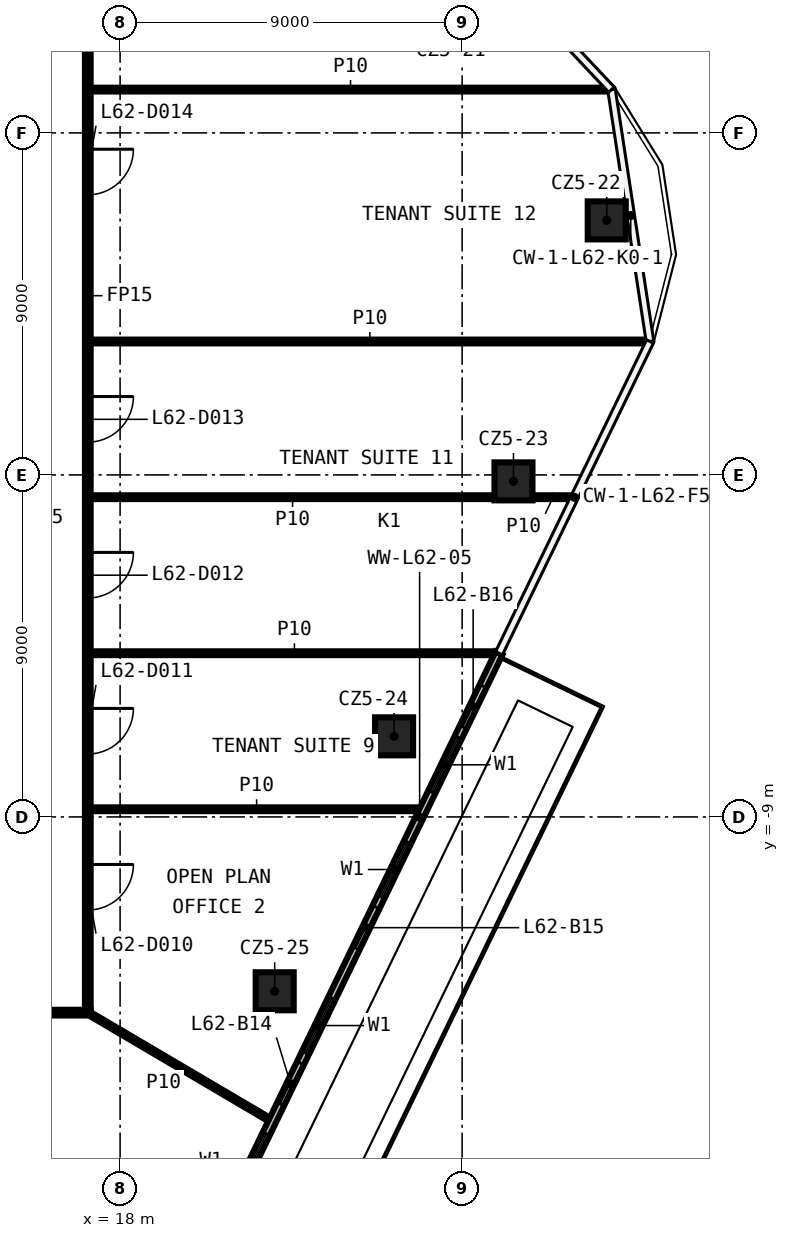
"""IFC4 building model, lengths in metres.
Left out: names, types, materials, properties, quantities, classifications, styles, units other than length and angle.
Written with IfcOpenShell. Run it as: python <this file> out.ifc"""

import sys

from ifc_helpers import new_model, si_unit, direction, frame, frame_2d, origin, origin_2d, place, context, subcontext, project, spatial, rectangle, extrude, element, fill, save


model = new_model("IFC4")
c1 = context("Model", 3, precision=1e-05, world=origin(), true_north=direction((0.0, 1.0)))
c2 = subcontext(c1, "Body", "Model", "MODEL_VIEW")
j1 = project(units=[si_unit("LENGTHUNIT", "METRE"), si_unit("PLANEANGLEUNIT", "RADIAN")], contexts=[c1])
p1 = place(None, origin())
s1 = spatial("IfcSite", under=j1, at=p1, CompositionType="ELEMENT")
p2 = place(p1, origin())
s2 = spatial("IfcBuilding", under=s1, at=p2, CompositionType="ELEMENT")
p3 = place(p2, frame((0.0, 0.0, 294.2)))
s3 = spatial("IfcBuildingStorey", under=s2, at=p3, CompositionType="ELEMENT", Elevation=294.2)
for number, where, z_axis, x_axis in (
    (1, (30.805, 6.698, 0.0), (0.0, 0.0, 1.0), (1.0, 0.0, 0.0)),
    (2, (28.351, -0.17, 0.0), (0.0, 0.0, 1.0), (1.0, 0.0, 0.0)),
    (3, (25.21, -6.879, 0.0), (0.0, 0.0, 1.0), (1.0, 0.0, 0.0)),
    (4, (22.068, -13.588, 0.0), (0.0, 0.0, 1.0), (1.0, 0.0, 0.0)),
):
    element("IfcColumn", number, at=place(p3, frame(where, z_axis=z_axis, x_axis=x_axis)), inside=s3, PredefinedType="COLUMN", context=c2, shape_type="SweptSolid", body=[
        extrude(rectangle(XDim=1.0, YDim=1.0, at=origin_2d()), origin(), (0.0, 0.0, 1.0), 3.82),
    ])
p4 = place(p3, frame((17.225, -14.15, 0.0), z_axis=(0.0, 0.0, 1.0), x_axis=(-1.0, 0.0, 0.0)))
e5 = element("IfcWall", 5, at=p4, inside=s3, PredefinedType="PARTITIONING", context=c2, shape_type="SweptSolid", body=[
    extrude(rectangle(XDim=34.45, YDim=0.15, at=frame_2d((17.225, 0.0))), origin(), (0.0, 0.0, 1.0), 3.82),
])
p5 = place(p4, frame((31.54, 0.0, 0.0)))
e6 = element("IfcOpeningElement", 6, at=p5, cuts=e5, PredefinedType="OPENING", context=c2, shape_type="SweptSolid", body=[
    extrude(rectangle(XDim=1.2, YDim=2.1, at=frame_2d((0.6, 1.05))), frame((0.0, 0.085, 0.0), z_axis=(0.0, -1.0, 0.0), x_axis=(1.0, 0.0, 0.0)), (0.0, 0.0, 1.0), 0.17),
])
p6 = place(p4, frame((25.804, 0.0, 0.0)))
e7 = element("IfcOpeningElement", 7, at=p6, cuts=e5, PredefinedType="OPENING", context=c2, shape_type="SweptSolid", body=[
    extrude(rectangle(XDim=1.2, YDim=2.1, at=frame_2d((0.6, 1.05))), frame((0.0, 0.085, 0.0), z_axis=(0.0, -1.0, 0.0), x_axis=(1.0, 0.0, 0.0)), (0.0, 0.0, 1.0), 0.17),
])
p7 = place(p4, frame((17.681, 0.0, 0.0)))
e8 = element("IfcOpeningElement", 8, at=p7, cuts=e5, PredefinedType="OPENING", context=c2, shape_type="SweptSolid", body=[
    extrude(rectangle(XDim=1.2, YDim=2.1, at=frame_2d((0.6, 1.05))), frame((0.0, 0.085, 0.0), z_axis=(0.0, -1.0, 0.0), x_axis=(1.0, 0.0, 0.0)), (0.0, 0.0, 1.0), 0.17),
])
p8 = place(p4, frame((10.752, 0.0, 0.0)))
e9 = element("IfcOpeningElement", 9, at=p8, cuts=e5, PredefinedType="OPENING", context=c2, shape_type="SweptSolid", body=[
    extrude(rectangle(XDim=1.2, YDim=2.1, at=frame_2d((0.6, 1.05))), frame((0.0, 0.085, 0.0), z_axis=(0.0, -1.0, 0.0), x_axis=(1.0, 0.0, 0.0)), (0.0, 0.0, 1.0), 0.17),
])
p9 = place(p4, frame((6.133, 0.0, 0.0)))
e10 = element("IfcOpeningElement", 10, at=p9, cuts=e5, PredefinedType="OPENING", context=c2, shape_type="SweptSolid", body=[
    extrude(rectangle(XDim=1.2, YDim=2.1, at=frame_2d((0.6, 1.05))), frame((0.0, 0.085, 0.0), z_axis=(0.0, -1.0, 0.0), x_axis=(1.0, 0.0, 0.0)), (0.0, 0.0, 1.0), 0.17),
])
p10 = place(p4, frame((1.851, 0.0, 0.0)))
e11 = element("IfcOpeningElement", 11, at=p10, cuts=e5, PredefinedType="OPENING", context=c2, shape_type="SweptSolid", body=[
    extrude(rectangle(XDim=1.2, YDim=2.1, at=frame_2d((0.6, 1.05))), frame((0.0, 0.085, 0.0), z_axis=(0.0, -1.0, 0.0), x_axis=(1.0, 0.0, 0.0)), (0.0, 0.0, 1.0), 0.17),
])
p11 = place(p3, frame((17.225, -8.798, 0.0), z_axis=(0.0, 0.0, 1.0), x_axis=(1.0, 0.0, 0.0)))
e12 = element("IfcWall", 12, at=p11, inside=s3, PredefinedType="PARTITIONING", context=c2, shape_type="SweptSolid", body=[
    extrude(rectangle(XDim=8.735, YDim=0.1, at=frame_2d((4.368, 0.0))), origin(), (0.0, 0.0, 1.0), 3.82),
])
p12 = place(p3, frame((17.225, -4.692, 0.0), z_axis=(0.0, 0.0, 1.0), x_axis=(1.0, 0.0, 0.0)))
e13 = element("IfcWall", 13, at=p12, inside=s3, PredefinedType="PARTITIONING", context=c2, shape_type="SweptSolid", body=[
    extrude(rectangle(XDim=10.723, YDim=0.1, at=frame_2d((5.362, 0.0))), origin(), (0.0, 0.0, 1.0), 3.82),
])
p13 = place(p3, frame((17.225, -0.586, 0.0), z_axis=(0.0, 0.0, 1.0), x_axis=(1.0, 0.0, 0.0)))
e14 = element("IfcWall", 14, at=p13, inside=s3, PredefinedType="PARTITIONING", context=c2, shape_type="SweptSolid", body=[
    extrude(rectangle(XDim=10.626, YDim=0.1, at=frame_2d((5.313, 0.0))), origin(), (0.0, 0.0, 1.0), 3.82),
])
p14 = place(p3, frame((28.851, -0.586, 0.0), z_axis=(0.0, 0.0, 1.0), x_axis=(1.0, 0.0, 0.0)))
e15 = element("IfcWall", 15, at=p14, inside=s3, PredefinedType="PARTITIONING", context=c2, shape_type="SweptSolid", body=[
    extrude(rectangle(XDim=1.086, YDim=0.1, at=frame_2d((0.543, 0.0))), origin(), (0.0, 0.0, 1.0), 3.82),
])
p15 = place(p3, frame((17.225, 3.511, 0.0), z_axis=(0.0, 0.0, 1.0), x_axis=(1.0, 0.0, 0.0)))
e16 = element("IfcWall", 16, at=p15, inside=s3, PredefinedType="PARTITIONING", context=c2, shape_type="SweptSolid", body=[
    extrude(rectangle(XDim=14.696, YDim=0.1, at=frame_2d((7.348, 0.0))), origin(), (0.0, 0.0, 1.0), 3.82),
])
p16 = place(p3, frame((17.225, 10.14, 0.0), z_axis=(0.0, 0.0, 1.0), x_axis=(1.0, 0.0, 0.0)))
e17 = element("IfcWall", 17, at=p16, inside=s3, PredefinedType="PARTITIONING", context=c2, shape_type="SweptSolid", body=[
    extrude(rectangle(XDim=13.677, YDim=0.1, at=frame_2d((6.839, 0.0))), origin(), (0.0, 0.0, 1.0), 3.82),
])
p17 = place(p3, frame((17.15, 14.075, 0.0), z_axis=(0.0, 0.0, 1.0), x_axis=(0.0, -1.0, 0.0)))
e18 = element("IfcWall", 18, at=p17, inside=s3, PredefinedType="PARTITIONING", context=c2, shape_type="SweptSolid", body=[
    extrude(rectangle(XDim=28.15, YDim=0.15, at=frame_2d((14.075, 0.0))), origin(), (0.0, 0.0, 1.0), 3.82),
])
p18 = place(p17, frame((24.326, 0.0, 0.0)))
e19 = element("IfcOpeningElement", 19, at=p18, cuts=e18, PredefinedType="OPENING", context=c2, shape_type="SweptSolid", body=[
    extrude(rectangle(XDim=1.2, YDim=2.1, at=frame_2d((0.6, 1.05))), frame((0.0, 0.085, 0.0), z_axis=(0.0, -1.0, 0.0), x_axis=(1.0, 0.0, 0.0)), (0.0, 0.0, 1.0), 0.17),
])
p19 = place(p17, frame((20.22, 0.0, 0.0)))
e20 = element("IfcOpeningElement", 20, at=p19, cuts=e18, PredefinedType="OPENING", context=c2, shape_type="SweptSolid", body=[
    extrude(rectangle(XDim=1.2, YDim=2.1, at=frame_2d((0.6, 1.05))), frame((0.0, 0.085, 0.0), z_axis=(0.0, -1.0, 0.0), x_axis=(1.0, 0.0, 0.0)), (0.0, 0.0, 1.0), 0.17),
])
p20 = place(p17, frame((16.114, 0.0, 0.0)))
e21 = element("IfcOpeningElement", 21, at=p20, cuts=e18, PredefinedType="OPENING", context=c2, shape_type="SweptSolid", body=[
    extrude(rectangle(XDim=1.2, YDim=2.1, at=frame_2d((0.6, 1.05))), frame((0.0, 0.085, 0.0), z_axis=(0.0, -1.0, 0.0), x_axis=(1.0, 0.0, 0.0)), (0.0, 0.0, 1.0), 0.17),
])
p21 = place(p17, frame((12.012, 0.0, 0.0)))
e22 = element("IfcOpeningElement", 22, at=p21, cuts=e18, PredefinedType="OPENING", context=c2, shape_type="SweptSolid", body=[
    extrude(rectangle(XDim=1.2, YDim=2.1, at=frame_2d((0.6, 1.05))), frame((0.0, 0.085, 0.0), z_axis=(0.0, -1.0, 0.0), x_axis=(1.0, 0.0, 0.0)), (0.0, 0.0, 1.0), 0.17),
])
p22 = place(p17, frame((5.504, 0.0, 0.0)))
e23 = element("IfcOpeningElement", 23, at=p22, cuts=e18, PredefinedType="OPENING", context=c2, shape_type="SweptSolid", body=[
    extrude(rectangle(XDim=1.2, YDim=2.1, at=frame_2d((0.6, 1.05))), frame((0.0, 0.085, 0.0), z_axis=(0.0, -1.0, 0.0), x_axis=(1.0, 0.0, 0.0)), (0.0, 0.0, 1.0), 0.17),
])
p23 = place(p17, frame((1.622, 0.0, 0.0)))
e24 = element("IfcOpeningElement", 24, at=p23, cuts=e18, PredefinedType="OPENING", context=c2, shape_type="SweptSolid", body=[
    extrude(rectangle(XDim=1.2, YDim=2.1, at=frame_2d((0.6, 1.05))), frame((0.0, 0.085, 0.0), z_axis=(0.0, -1.0, 0.0), x_axis=(1.0, 0.0, 0.0)), (0.0, 0.0, 1.0), 0.17),
])
p24 = place(p3, frame((17.15, -14.15, 0.0), z_axis=(0.0, 0.0, 1.0), x_axis=(0.861619958058, -0.507553985184, 0.0)))
e25 = element("IfcWall", 25, at=p24, inside=s3, PredefinedType="PARTITIONING", context=c2, shape_type="SweptSolid", body=[
    extrude(rectangle(XDim=5.615, YDim=0.1, at=frame_2d((2.808, 0.0))), origin(), (0.0, 0.0, 1.0), 3.82),
])
p25 = place(p3, frame((20.017, -21.116, 0.0), z_axis=(0.0, 0.0, 1.0), x_axis=(0.435859541182, 0.90001470008, 0.0)))
e26 = element("IfcWall", 26, at=p25, inside=s3, PredefinedType="SOLIDWALL", context=c2, shape_type="SweptSolid", body=[
    extrude(rectangle(XDim=18.249, YDim=0.2, at=frame_2d((9.125, 0.0))), origin(), (0.0, 0.0, 1.0), 3.82),
])
p26 = place(p25, frame((2.6, 0.0, 0.6)))
e27 = element("IfcOpeningElement", 27, at=p26, cuts=e26, PredefinedType="OPENING", context=c2, shape_type="SweptSolid", body=[
    extrude(rectangle(XDim=1.6, YDim=2.4, at=frame_2d((0.8, 1.2))), frame((0.0, 0.11, 0.0), z_axis=(0.0, -1.0, 0.0), x_axis=(1.0, 0.0, 0.0)), (0.0, 0.0, 1.0), 0.22),
])
p27 = place(p25, frame((1.1, 0.0, 0.0)))
e28 = element("IfcOpeningElement", 28, at=p27, cuts=e26, PredefinedType="OPENING", context=c2, shape_type="SweptSolid", body=[
    extrude(rectangle(XDim=1.2, YDim=2.4, at=frame_2d((0.6, 1.2))), frame((0.0, 0.11, 0.0), z_axis=(0.0, -1.0, 0.0), x_axis=(1.0, 0.0, 0.0)), (0.0, 0.0, 1.0), 0.22),
])
p28 = place(p25, frame((6.562, 0.0, 0.6)))
e29 = element("IfcOpeningElement", 29, at=p28, cuts=e26, PredefinedType="OPENING", context=c2, shape_type="SweptSolid", body=[
    extrude(rectangle(XDim=1.6, YDim=2.4, at=frame_2d((0.8, 1.2))), frame((0.0, 0.11, 0.0), z_axis=(0.0, -1.0, 0.0), x_axis=(1.0, 0.0, 0.0)), (0.0, 0.0, 1.0), 0.22),
])
p29 = place(p25, frame((5.062, 0.0, 0.0)))
e30 = element("IfcOpeningElement", 30, at=p29, cuts=e26, PredefinedType="OPENING", context=c2, shape_type="SweptSolid", body=[
    extrude(rectangle(XDim=1.2, YDim=2.4, at=frame_2d((0.6, 1.2))), frame((0.0, 0.11, 0.0), z_axis=(0.0, -1.0, 0.0), x_axis=(1.0, 0.0, 0.0)), (0.0, 0.0, 1.0), 0.22),
])
p30 = place(p25, frame((11.125, 0.0, 0.6)))
e31 = element("IfcOpeningElement", 31, at=p30, cuts=e26, PredefinedType="OPENING", context=c2, shape_type="SweptSolid", body=[
    extrude(rectangle(XDim=1.6, YDim=2.4, at=frame_2d((0.8, 1.2))), frame((0.0, 0.11, 0.0), z_axis=(0.0, -1.0, 0.0), x_axis=(1.0, 0.0, 0.0)), (0.0, 0.0, 1.0), 0.22),
])
p31 = place(p25, frame((9.625, 0.0, 0.0)))
e32 = element("IfcOpeningElement", 32, at=p31, cuts=e26, PredefinedType="OPENING", context=c2, shape_type="SweptSolid", body=[
    extrude(rectangle(XDim=1.2, YDim=2.4, at=frame_2d((0.6, 1.2))), frame((0.0, 0.11, 0.0), z_axis=(0.0, -1.0, 0.0), x_axis=(1.0, 0.0, 0.0)), (0.0, 0.0, 1.0), 0.22),
])
p32 = place(p25, frame((14.187, 0.0, 0.6)))
e33 = element("IfcOpeningElement", 33, at=p32, cuts=e26, PredefinedType="OPENING", context=c2, shape_type="SweptSolid", body=[
    extrude(rectangle(XDim=1.6, YDim=2.4, at=frame_2d((0.8, 1.2))), frame((0.0, 0.11, 0.0), z_axis=(0.0, -1.0, 0.0), x_axis=(1.0, 0.0, 0.0)), (0.0, 0.0, 1.0), 0.22),
])
p33 = place(p25, frame((16.087, 0.0, 0.0)))
e34 = element("IfcOpeningElement", 34, at=p33, cuts=e26, PredefinedType="OPENING", context=c2, shape_type="SweptSolid", body=[
    extrude(rectangle(XDim=1.2, YDim=2.4, at=frame_2d((0.6, 1.2))), frame((0.0, 0.11, 0.0), z_axis=(0.0, -1.0, 0.0), x_axis=(1.0, 0.0, 0.0)), (0.0, 0.0, 1.0), 0.22),
])
p34 = place(p18, origin())
e35 = element("IfcDoor", 35, at=p34, inside=s3, OperationType="SINGLE_SWING_LEFT", PredefinedType="DOOR", context=c2, shape_type="SweptSolid", body=[
    extrude(rectangle(XDim=1.2, YDim=2.1, at=frame_2d((0.6, 1.05))), frame((0.0, 0.025, 0.0), z_axis=(0.0, -1.0, 0.0), x_axis=(1.0, 0.0, 0.0)), (0.0, 0.0, 1.0), 0.05),
])
fill(e19, e35)
p35 = place(p19, origin())
e36 = element("IfcDoor", 36, at=p35, inside=s3, OperationType="SINGLE_SWING_RIGHT", PredefinedType="DOOR", context=c2, shape_type="SweptSolid", body=[
    extrude(rectangle(XDim=1.2, YDim=2.1, at=frame_2d((0.6, 1.05))), frame((0.0, 0.025, 0.0), z_axis=(0.0, -1.0, 0.0), x_axis=(1.0, 0.0, 0.0)), (0.0, 0.0, 1.0), 0.05),
])
fill(e20, e36)
p36 = place(p20, origin())
e37 = element("IfcDoor", 37, at=p36, inside=s3, OperationType="SINGLE_SWING_LEFT", PredefinedType="DOOR", context=c2, shape_type="SweptSolid", body=[
    extrude(rectangle(XDim=1.2, YDim=2.1, at=frame_2d((0.6, 1.05))), frame((0.0, 0.025, 0.0), z_axis=(0.0, -1.0, 0.0), x_axis=(1.0, 0.0, 0.0)), (0.0, 0.0, 1.0), 0.05),
])
fill(e21, e37)
p37 = place(p21, origin())
e38 = element("IfcDoor", 38, at=p37, inside=s3, OperationType="SINGLE_SWING_RIGHT", PredefinedType="DOOR", context=c2, shape_type="SweptSolid", body=[
    extrude(rectangle(XDim=1.2, YDim=2.1, at=frame_2d((0.6, 1.05))), frame((0.0, 0.025, 0.0), z_axis=(0.0, -1.0, 0.0), x_axis=(1.0, 0.0, 0.0)), (0.0, 0.0, 1.0), 0.05),
])
fill(e22, e38)
p38 = place(p22, origin())
e39 = element("IfcDoor", 39, at=p38, inside=s3, OperationType="SINGLE_SWING_LEFT", PredefinedType="DOOR", context=c2, shape_type="SweptSolid", body=[
    extrude(rectangle(XDim=1.2, YDim=2.1, at=frame_2d((0.6, 1.05))), frame((0.0, 0.025, 0.0), z_axis=(0.0, -1.0, 0.0), x_axis=(1.0, 0.0, 0.0)), (0.0, 0.0, 1.0), 0.05),
])
fill(e23, e39)
p39 = place(p26, origin())
e40 = element("IfcWindow", 40, at=p39, inside=s3, PartitioningType="SINGLE_PANEL", PredefinedType="WINDOW", context=c2, shape_type="SweptSolid", body=[
    extrude(rectangle(XDim=1.6, YDim=2.4, at=frame_2d((0.8, 1.2))), frame((0.0, 0.03, 0.0), z_axis=(0.0, -1.0, 0.0), x_axis=(1.0, 0.0, 0.0)), (0.0, 0.0, 1.0), 0.06),
])
fill(e27, e40)
p40 = place(p28, origin())
e41 = element("IfcWindow", 41, at=p40, inside=s3, PartitioningType="SINGLE_PANEL", PredefinedType="WINDOW", context=c2, shape_type="SweptSolid", body=[
    extrude(rectangle(XDim=1.6, YDim=2.4, at=frame_2d((0.8, 1.2))), frame((0.0, 0.03, 0.0), z_axis=(0.0, -1.0, 0.0), x_axis=(1.0, 0.0, 0.0)), (0.0, 0.0, 1.0), 0.06),
])
fill(e29, e41)
p41 = place(p29, origin())
e42 = element("IfcDoor", 42, at=p41, inside=s3, OperationType="SLIDING_TO_LEFT", PredefinedType="DOOR", context=c2, shape_type="SweptSolid", body=[
    extrude(rectangle(XDim=1.2, YDim=2.4, at=frame_2d((0.6, 1.2))), frame((0.0, 0.025, 0.0), z_axis=(0.0, -1.0, 0.0), x_axis=(1.0, 0.0, 0.0)), (0.0, 0.0, 1.0), 0.05),
])
fill(e30, e42)
p42 = place(p30, origin())
e43 = element("IfcWindow", 43, at=p42, inside=s3, PartitioningType="SINGLE_PANEL", PredefinedType="WINDOW", context=c2, shape_type="SweptSolid", body=[
    extrude(rectangle(XDim=1.6, YDim=2.4, at=frame_2d((0.8, 1.2))), frame((0.0, 0.03, 0.0), z_axis=(0.0, -1.0, 0.0), x_axis=(1.0, 0.0, 0.0)), (0.0, 0.0, 1.0), 0.06),
])
fill(e31, e43)
p43 = place(p31, origin())
e44 = element("IfcDoor", 44, at=p43, inside=s3, OperationType="SLIDING_TO_LEFT", PredefinedType="DOOR", context=c2, shape_type="SweptSolid", body=[
    extrude(rectangle(XDim=1.2, YDim=2.4, at=frame_2d((0.6, 1.2))), frame((0.0, 0.025, 0.0), z_axis=(0.0, -1.0, 0.0), x_axis=(1.0, 0.0, 0.0)), (0.0, 0.0, 1.0), 0.05),
])
fill(e32, e44)
p44 = place(p32, origin())
e45 = element("IfcWindow", 45, at=p44, inside=s3, PartitioningType="SINGLE_PANEL", PredefinedType="WINDOW", context=c2, shape_type="SweptSolid", body=[
    extrude(rectangle(XDim=1.6, YDim=2.4, at=frame_2d((0.8, 1.2))), frame((0.0, 0.03, 0.0), z_axis=(0.0, -1.0, 0.0), x_axis=(1.0, 0.0, 0.0)), (0.0, 0.0, 1.0), 0.06),
])
fill(e33, e45)
p45 = place(p33, origin())
e46 = element("IfcDoor", 46, at=p45, inside=s3, OperationType="SLIDING_TO_LEFT", PredefinedType="DOOR", context=c2, shape_type="SweptSolid", body=[
    extrude(rectangle(XDim=1.2, YDim=2.4, at=frame_2d((0.6, 1.2))), frame((0.0, 0.025, 0.0), z_axis=(0.0, -1.0, 0.0), x_axis=(1.0, 0.0, 0.0)), (0.0, 0.0, 1.0), 0.05),
])
fill(e34, e46)
save(model, sys.argv[1])
